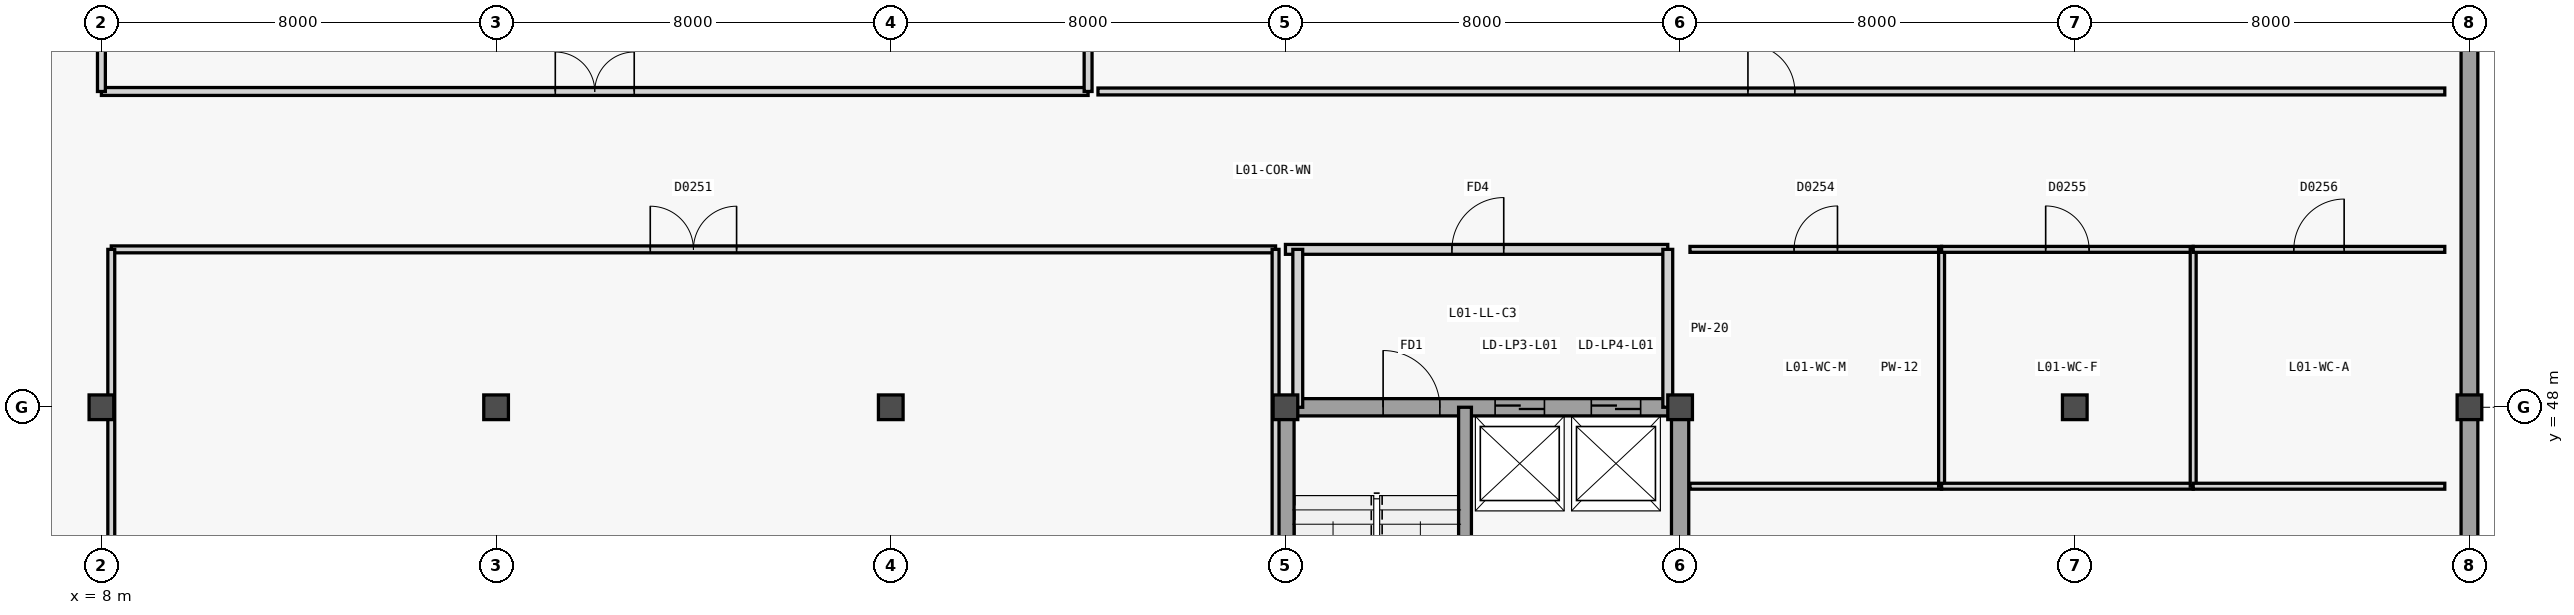
"""IFC4 building model, lengths in metres.
Left out: names, types, materials, properties, quantities, classifications, styles, units other than length and angle.
Written with IfcOpenShell. Run it as: python <this file> out.ifc"""

import sys

from ifc_helpers import new_model, si_unit, direction, frame, frame_2d, origin, origin_2d, place, context, subcontext, project, spatial, rectangle, extrude, element, fill, save


model = new_model("IFC4")
c1 = context("Model", 3, precision=1e-05, world=origin(), true_north=direction((0.0, 1.0)))
c2 = subcontext(c1, "Body", "Model", "MODEL_VIEW")
j1 = project(units=[si_unit("LENGTHUNIT", "METRE"), si_unit("PLANEANGLEUNIT", "RADIAN")], contexts=[c1])
p1 = place(None, origin())
s1 = spatial("IfcSite", under=j1, at=p1, CompositionType="ELEMENT")
p2 = place(p1, origin())
s2 = spatial("IfcBuilding", under=s1, at=p2, CompositionType="ELEMENT")
p3 = place(p2, frame((0.0, 0.0, 5.4)))
s3 = spatial("IfcBuildingStorey", under=s2, at=p3, CompositionType="ELEMENT", Elevation=5.4)
for number, where, z_axis, x_axis in (
    (1, (8.0, 48.0, 0.0), (0.0, 0.0, 1.0), (1.0, 0.0, 0.0)),
    (2, (16.0, 48.0, 0.0), (0.0, 0.0, 1.0), (1.0, 0.0, 0.0)),
    (3, (24.0, 48.0, 0.0), (0.0, 0.0, 1.0), (1.0, 0.0, 0.0)),
    (4, (32.0, 48.0, 0.0), (0.0, 0.0, 1.0), (1.0, 0.0, 0.0)),
    (5, (40.0, 48.0, 0.0), (0.0, 0.0, 1.0), (1.0, 0.0, 0.0)),
    (6, (48.0, 48.0, 0.0), (0.0, 0.0, 1.0), (1.0, 0.0, 0.0)),
):
    element("IfcColumn", number, at=place(p3, frame(where, z_axis=z_axis, x_axis=x_axis)), inside=s3, PredefinedType="COLUMN", context=c2, shape_type="SweptSolid", body=[
        extrude(rectangle(XDim=0.5, YDim=0.5, at=origin_2d()), origin(), (0.0, 0.0, 1.0), 4.8),
    ])
p4 = place(p3, frame((56.0, 48.0, 0.0), z_axis=(0.0, 0.0, 1.0), x_axis=(1.0, 0.0, 0.0)))
e7 = element("IfcColumn", 7, at=p4, inside=s3, PredefinedType="COLUMN", context=c2, shape_type="SweptSolid", body=[
    extrude(rectangle(XDim=0.5, YDim=0.5, at=origin_2d()), origin(), (0.0, 0.0, 1.0), 4.56),
])
p5 = place(p3, frame((56.0, 64.0, 0.0), z_axis=(0.0, 0.0, 1.0), x_axis=(0.0, -1.0, 0.0)))
e8 = element("IfcWall", 8, at=p5, inside=s3, PredefinedType="SOLIDWALL", context=c2, shape_type="SweptSolid", body=[
    extrude(rectangle(XDim=64.0, YDim=0.34, at=frame_2d((32.0, 0.0))), origin(), (0.0, 0.0, 1.0), 4.56),
])
for number, where, z_axis, x_axis in (
    (9, (32.0, 40.0, 0.0), (0.0, 0.0, 1.0), (0.0, 1.0, 0.0)),
    (10, (40.0, 40.0, 0.0), (0.0, 0.0, 1.0), (0.0, 1.0, 0.0)),
):
    element("IfcWall", number, at=place(p3, frame(where, z_axis=z_axis, x_axis=x_axis)), inside=s3, PredefinedType="SHEAR", context=c2, shape_type="SweptSolid", body=[
        extrude(rectangle(XDim=8.0, YDim=0.35, at=frame_2d((4.0, 0.0))), origin(), (0.0, 0.0, 1.0), 4.8),
    ])
p6 = place(p3, frame((32.0, 48.0, 0.0), z_axis=(0.0, 0.0, 1.0), x_axis=(1.0, 0.0, 0.0)))
e11 = element("IfcWall", 11, at=p6, inside=s3, PredefinedType="SHEAR", context=c2, shape_type="SweptSolid", body=[
    extrude(rectangle(XDim=8.0, YDim=0.35, at=frame_2d((4.0, 0.0))), origin(), (0.0, 0.0, 1.0), 4.8),
])
p7 = place(p6, frame((1.98, 0.0, 0.0)))
e12 = element("IfcOpeningElement", 12, at=p7, cuts=e11, PredefinedType="OPENING", context=c2, shape_type="SweptSolid", body=[
    extrude(rectangle(XDim=1.15, YDim=2.2, at=frame_2d((0.575, 1.1))), frame((0.0, 0.185, 0.0), z_axis=(0.0, -1.0, 0.0), x_axis=(1.0, 0.0, 0.0)), (0.0, 0.0, 1.0), 0.37),
])
p8 = place(p6, frame((4.25, 0.0, 0.0)))
e13 = element("IfcOpeningElement", 13, at=p8, cuts=e11, PredefinedType="OPENING", context=c2, shape_type="SweptSolid", body=[
    extrude(rectangle(XDim=1.0, YDim=2.15, at=frame_2d((0.5, 1.075))), frame((0.0, 0.185, 0.0), z_axis=(0.0, -1.0, 0.0), x_axis=(1.0, 0.0, 0.0)), (0.0, 0.0, 1.0), 0.37),
])
p9 = place(p6, frame((6.2, 0.0, 0.0)))
e14 = element("IfcOpeningElement", 14, at=p9, cuts=e11, PredefinedType="OPENING", context=c2, shape_type="SweptSolid", body=[
    extrude(rectangle(XDim=1.0, YDim=2.15, at=frame_2d((0.5, 1.075))), frame((0.0, 0.185, 0.0), z_axis=(0.0, -1.0, 0.0), x_axis=(1.0, 0.0, 0.0)), (0.0, 0.0, 1.0), 0.37),
])
p10 = place(p3, frame((35.64, 40.0, 0.0), z_axis=(0.0, 0.0, 1.0), x_axis=(0.0, 1.0, 0.0)))
e15 = element("IfcWall", 15, at=p10, inside=s3, PredefinedType="SHEAR", context=c2, shape_type="SweptSolid", body=[
    extrude(rectangle(XDim=8.0, YDim=0.26, at=frame_2d((4.0, 0.0))), origin(), (0.0, 0.0, 1.0), 4.8),
])
p11 = place(p3, frame((32.0, 51.2, 0.0), z_axis=(0.0, 0.0, 1.0), x_axis=(1.0, 0.0, 0.0)))
e16 = element("IfcWall", 16, at=p11, inside=s3, PredefinedType="PARTITIONING", context=c2, shape_type="SweptSolid", body=[
    extrude(rectangle(XDim=7.75, YDim=0.2, at=frame_2d((3.875, 0.0))), origin(), (0.0, 0.0, 1.0), 4.52),
])
p12 = place(p11, frame((3.375, 0.0, 0.0)))
e17 = element("IfcOpeningElement", 17, at=p12, cuts=e16, PredefinedType="OPENING", context=c2, shape_type="SweptSolid", body=[
    extrude(rectangle(XDim=1.05, YDim=2.15, at=frame_2d((0.525, 1.075))), frame((0.0, 0.11, 0.0), z_axis=(0.0, -1.0, 0.0), x_axis=(1.0, 0.0, 0.0)), (0.0, 0.0, 1.0), 0.22),
])
for number, where, z_axis, x_axis in (
    (18, (39.75, 48.0, 0.0), (0.0, 0.0, 1.0), (0.0, 1.0, 0.0)),
    (19, (32.25, 48.0, 0.0), (0.0, 0.0, 1.0), (0.0, 1.0, 0.0)),
):
    element("IfcWall", number, at=place(p3, frame(where, z_axis=z_axis, x_axis=x_axis)), inside=s3, PredefinedType="PARTITIONING", context=c2, shape_type="SweptSolid", body=[
        extrude(rectangle(XDim=3.2, YDim=0.2, at=frame_2d((1.6, 0.0))), origin(), (0.0, 0.0, 1.0), 3.92),
    ])
p13 = place(p3, frame((8.2, 51.2, 0.0), z_axis=(0.0, 0.0, 1.0), x_axis=(1.0, 0.0, 0.0)))
e20 = element("IfcWall", 20, at=p13, inside=s3, PredefinedType="PARTITIONING", context=c2, shape_type="SweptSolid", body=[
    extrude(rectangle(XDim=23.6, YDim=0.14, at=frame_2d((11.8, 0.0))), origin(), (0.0, 0.0, 1.0), 4.54),
])
p14 = place(p13, frame((10.925, 0.0, 0.0)))
e21 = element("IfcOpeningElement", 21, at=p14, cuts=e20, PredefinedType="OPENING", context=c2, shape_type="SweptSolid", body=[
    extrude(rectangle(XDim=1.75, YDim=2.2, at=frame_2d((0.875, 1.1))), frame((0.0, 0.08, 0.0), z_axis=(0.0, -1.0, 0.0), x_axis=(1.0, 0.0, 0.0)), (0.0, 0.0, 1.0), 0.16),
])
for number, where, z_axis, x_axis in (
    (22, (8.2, 32.2, 0.0), (0.0, 0.0, 1.0), (0.0, 1.0, 0.0)),
    (23, (31.8, 32.2, 0.0), (0.0, 0.0, 1.0), (0.0, 1.0, 0.0)),
):
    element("IfcWall", number, at=place(p3, frame(where, z_axis=z_axis, x_axis=x_axis)), inside=s3, PredefinedType="PARTITIONING", context=c2, shape_type="SweptSolid", body=[
        extrude(rectangle(XDim=19.0, YDim=0.14, at=frame_2d((9.5, 0.0))), origin(), (0.0, 0.0, 1.0), 3.92),
    ])
p15 = place(p3, frame((8.0, 54.4, 0.0), z_axis=(0.0, 0.0, 1.0), x_axis=(1.0, 0.0, 0.0)))
e24 = element("IfcWall", 24, at=p15, inside=s3, PredefinedType="PARTITIONING", context=c2, shape_type="SweptSolid", body=[
    extrude(rectangle(XDim=20.0, YDim=0.16, at=frame_2d((10.0, 0.0))), origin(), (0.0, 0.0, 1.0), 4.54),
])
p16 = place(p15, frame((9.2, 0.0, 0.0)))
e25 = element("IfcOpeningElement", 25, at=p16, cuts=e24, PredefinedType="OPENING", context=c2, shape_type="SweptSolid", body=[
    extrude(rectangle(XDim=1.6, YDim=2.2, at=frame_2d((0.8, 1.1))), frame((0.0, 0.09, 0.0), z_axis=(0.0, -1.0, 0.0), x_axis=(1.0, 0.0, 0.0)), (0.0, 0.0, 1.0), 0.18),
])
p17 = place(p3, frame((8.0, 54.4, 0.0), z_axis=(0.0, 0.0, 1.0), x_axis=(0.0, 1.0, 0.0)))
e26 = element("IfcWall", 26, at=p17, inside=s3, PredefinedType="PARTITIONING", context=c2, shape_type="SweptSolid", body=[
    extrude(rectangle(XDim=9.1, YDim=0.16, at=frame_2d((4.55, 0.0))), origin(), (0.0, 0.0, 1.0), 3.92),
])
p18 = place(p3, frame((28.0, 54.4, 0.0), z_axis=(0.0, 0.0, 1.0), x_axis=(0.0, 1.0, 0.0)))
e27 = element("IfcWall", 27, at=p18, inside=s3, PredefinedType="PARTITIONING", context=c2, shape_type="SweptSolid", body=[
    extrude(rectangle(XDim=9.1, YDim=0.16, at=frame_2d((4.55, 0.0))), origin(), (0.0, 0.0, 1.0), 4.08),
])
p19 = place(p3, frame((28.2, 54.4, 0.0), z_axis=(0.0, 0.0, 1.0), x_axis=(1.0, 0.0, 0.0)))
e28 = element("IfcWall", 28, at=p19, inside=s3, PredefinedType="PARTITIONING", context=c2, shape_type="SweptSolid", body=[
    extrude(rectangle(XDim=27.3, YDim=0.14, at=frame_2d((13.65, 0.0))), origin(), (0.0, 0.0, 1.0), 4.54),
])
p20 = place(p19, frame((13.175, 0.0, 0.0)))
e29 = element("IfcOpeningElement", 29, at=p20, cuts=e28, PredefinedType="OPENING", context=c2, shape_type="SweptSolid", body=[
    extrude(rectangle(XDim=0.95, YDim=2.1, at=frame_2d((0.475, 1.05))), frame((0.0, 0.08, 0.0), z_axis=(0.0, -1.0, 0.0), x_axis=(1.0, 0.0, 0.0)), (0.0, 0.0, 1.0), 0.16),
])
p21 = place(p3, frame((40.2, 46.4, 0.0), z_axis=(0.0, 0.0, 1.0), x_axis=(1.0, 0.0, 0.0)))
e30 = element("IfcWall", 30, at=p21, inside=s3, PredefinedType="PARTITIONING", context=c2, shape_type="SweptSolid", body=[
    extrude(rectangle(XDim=5.1, YDim=0.12, at=frame_2d((2.55, 0.0))), origin(), (0.0, 0.0, 1.0), 4.54),
])
p22 = place(p3, frame((40.2, 51.2, 0.0), z_axis=(0.0, 0.0, 1.0), x_axis=(1.0, 0.0, 0.0)))
e31 = element("IfcWall", 31, at=p22, inside=s3, PredefinedType="PARTITIONING", context=c2, shape_type="SweptSolid", body=[
    extrude(rectangle(XDim=5.1, YDim=0.12, at=frame_2d((2.55, 0.0))), origin(), (0.0, 0.0, 1.0), 4.54),
])
p23 = place(p22, frame((2.11, 0.0, 0.0)))
e32 = element("IfcOpeningElement", 32, at=p23, cuts=e31, PredefinedType="OPENING", context=c2, shape_type="SweptSolid", body=[
    extrude(rectangle(XDim=0.88, YDim=2.1, at=frame_2d((0.44, 1.05))), frame((0.0, 0.07, 0.0), z_axis=(0.0, -1.0, 0.0), x_axis=(1.0, 0.0, 0.0)), (0.0, 0.0, 1.0), 0.14),
])
p24 = place(p3, frame((45.3, 46.4, 0.0), z_axis=(0.0, 0.0, 1.0), x_axis=(0.0, 1.0, 0.0)))
e33 = element("IfcWall", 33, at=p24, inside=s3, PredefinedType="PARTITIONING", context=c2, shape_type="SweptSolid", body=[
    extrude(rectangle(XDim=4.8, YDim=0.12, at=frame_2d((2.4, 0.0))), origin(), (0.0, 0.0, 1.0), 4.54),
])
p25 = place(p3, frame((45.3, 46.4, 0.0), z_axis=(0.0, 0.0, 1.0), x_axis=(1.0, 0.0, 0.0)))
e34 = element("IfcWall", 34, at=p25, inside=s3, PredefinedType="PARTITIONING", context=c2, shape_type="SweptSolid", body=[
    extrude(rectangle(XDim=5.1, YDim=0.12, at=frame_2d((2.55, 0.0))), origin(), (0.0, 0.0, 1.0), 4.54),
])
p26 = place(p3, frame((45.3, 51.2, 0.0), z_axis=(0.0, 0.0, 1.0), x_axis=(1.0, 0.0, 0.0)))
e35 = element("IfcWall", 35, at=p26, inside=s3, PredefinedType="PARTITIONING", context=c2, shape_type="SweptSolid", body=[
    extrude(rectangle(XDim=5.1, YDim=0.12, at=frame_2d((2.55, 0.0))), origin(), (0.0, 0.0, 1.0), 4.54),
])
p27 = place(p26, frame((2.11, 0.0, 0.0)))
e36 = element("IfcOpeningElement", 36, at=p27, cuts=e35, PredefinedType="OPENING", context=c2, shape_type="SweptSolid", body=[
    extrude(rectangle(XDim=0.88, YDim=2.1, at=frame_2d((0.44, 1.05))), frame((0.0, 0.07, 0.0), z_axis=(0.0, -1.0, 0.0), x_axis=(1.0, 0.0, 0.0)), (0.0, 0.0, 1.0), 0.14),
])
p28 = place(p3, frame((50.4, 46.4, 0.0), z_axis=(0.0, 0.0, 1.0), x_axis=(0.0, 1.0, 0.0)))
e37 = element("IfcWall", 37, at=p28, inside=s3, PredefinedType="PARTITIONING", context=c2, shape_type="SweptSolid", body=[
    extrude(rectangle(XDim=4.8, YDim=0.12, at=frame_2d((2.4, 0.0))), origin(), (0.0, 0.0, 1.0), 4.54),
])
p29 = place(p3, frame((50.4, 46.4, 0.0), z_axis=(0.0, 0.0, 1.0), x_axis=(1.0, 0.0, 0.0)))
e38 = element("IfcWall", 38, at=p29, inside=s3, PredefinedType="PARTITIONING", context=c2, shape_type="SweptSolid", body=[
    extrude(rectangle(XDim=5.1, YDim=0.12, at=frame_2d((2.55, 0.0))), origin(), (0.0, 0.0, 1.0), 4.54),
])
p30 = place(p3, frame((50.4, 51.2, 0.0), z_axis=(0.0, 0.0, 1.0), x_axis=(1.0, 0.0, 0.0)))
e39 = element("IfcWall", 39, at=p30, inside=s3, PredefinedType="PARTITIONING", context=c2, shape_type="SweptSolid", body=[
    extrude(rectangle(XDim=5.1, YDim=0.12, at=frame_2d((2.55, 0.0))), origin(), (0.0, 0.0, 1.0), 4.54),
])
p31 = place(p30, frame((2.04, 0.0, 0.0)))
e40 = element("IfcOpeningElement", 40, at=p31, cuts=e39, PredefinedType="OPENING", context=c2, shape_type="SweptSolid", body=[
    extrude(rectangle(XDim=1.02, YDim=2.1, at=frame_2d((0.51, 1.05))), frame((0.0, 0.07, 0.0), z_axis=(0.0, -1.0, 0.0), x_axis=(1.0, 0.0, 0.0)), (0.0, 0.0, 1.0), 0.14),
])
p32 = place(p7, origin())
e41 = element("IfcDoor", 41, at=p32, inside=s3, OperationType="SINGLE_SWING_LEFT", PredefinedType="DOOR", context=c2, shape_type="SweptSolid", body=[
    extrude(rectangle(XDim=1.15, YDim=2.2, at=frame_2d((0.575, 1.1))), frame((0.0, 0.025, 0.0), z_axis=(0.0, -1.0, 0.0), x_axis=(1.0, 0.0, 0.0)), (0.0, 0.0, 1.0), 0.05),
])
fill(e12, e41)
p33 = place(p8, origin())
e42 = element("IfcDoor", 42, at=p33, inside=s3, OperationType="DOUBLE_DOOR_SLIDING", PredefinedType="DOOR", context=c2, shape_type="SweptSolid", body=[
    extrude(rectangle(XDim=1.0, YDim=2.15, at=frame_2d((0.5, 1.075))), frame((0.0, 0.025, 0.0), z_axis=(0.0, -1.0, 0.0), x_axis=(1.0, 0.0, 0.0)), (0.0, 0.0, 1.0), 0.05),
])
fill(e13, e42)
p34 = place(p9, origin())
e43 = element("IfcDoor", 43, at=p34, inside=s3, OperationType="DOUBLE_DOOR_SLIDING", PredefinedType="DOOR", context=c2, shape_type="SweptSolid", body=[
    extrude(rectangle(XDim=1.0, YDim=2.15, at=frame_2d((0.5, 1.075))), frame((0.0, 0.025, 0.0), z_axis=(0.0, -1.0, 0.0), x_axis=(1.0, 0.0, 0.0)), (0.0, 0.0, 1.0), 0.05),
])
fill(e14, e43)
p35 = place(p12, origin())
e44 = element("IfcDoor", 44, at=p35, inside=s3, OperationType="SINGLE_SWING_RIGHT", PredefinedType="DOOR", context=c2, shape_type="SweptSolid", body=[
    extrude(rectangle(XDim=1.05, YDim=2.15, at=frame_2d((0.525, 1.075))), frame((0.0, 0.025, 0.0), z_axis=(0.0, -1.0, 0.0), x_axis=(1.0, 0.0, 0.0)), (0.0, 0.0, 1.0), 0.05),
])
fill(e17, e44)
p36 = place(p14, origin())
e45 = element("IfcDoor", 45, at=p36, inside=s3, OperationType="DOUBLE_DOOR_SINGLE_SWING", PredefinedType="DOOR", context=c2, shape_type="SweptSolid", body=[
    extrude(rectangle(XDim=1.75, YDim=2.2, at=frame_2d((0.875, 1.1))), frame((0.0, 0.025, 0.0), z_axis=(0.0, -1.0, 0.0), x_axis=(1.0, 0.0, 0.0)), (0.0, 0.0, 1.0), 0.05),
])
fill(e21, e45)
p37 = place(p16, origin())
e46 = element("IfcDoor", 46, at=p37, inside=s3, OperationType="DOUBLE_DOOR_SINGLE_SWING", PredefinedType="DOOR", context=c2, shape_type="SweptSolid", body=[
    extrude(rectangle(XDim=1.6, YDim=2.2, at=frame_2d((0.8, 1.1))), frame((0.0, 0.025, 0.0), z_axis=(0.0, -1.0, 0.0), x_axis=(1.0, 0.0, 0.0)), (0.0, 0.0, 1.0), 0.05),
])
fill(e25, e46)
p38 = place(p20, origin())
e47 = element("IfcDoor", 47, at=p38, inside=s3, OperationType="SINGLE_SWING_LEFT", PredefinedType="DOOR", context=c2, shape_type="SweptSolid", body=[
    extrude(rectangle(XDim=0.95, YDim=2.1, at=frame_2d((0.475, 1.05))), frame((0.0, 0.025, 0.0), z_axis=(0.0, -1.0, 0.0), x_axis=(1.0, 0.0, 0.0)), (0.0, 0.0, 1.0), 0.05),
])
fill(e29, e47)
p39 = place(p23, origin())
e48 = element("IfcDoor", 48, at=p39, inside=s3, OperationType="SINGLE_SWING_RIGHT", PredefinedType="DOOR", context=c2, shape_type="SweptSolid", body=[
    extrude(rectangle(XDim=0.88, YDim=2.1, at=frame_2d((0.44, 1.05))), frame((0.0, 0.025, 0.0), z_axis=(0.0, -1.0, 0.0), x_axis=(1.0, 0.0, 0.0)), (0.0, 0.0, 1.0), 0.05),
])
fill(e32, e48)
p40 = place(p27, origin())
e49 = element("IfcDoor", 49, at=p40, inside=s3, OperationType="SINGLE_SWING_LEFT", PredefinedType="DOOR", context=c2, shape_type="SweptSolid", body=[
    extrude(rectangle(XDim=0.88, YDim=2.1, at=frame_2d((0.44, 1.05))), frame((0.0, 0.025, 0.0), z_axis=(0.0, -1.0, 0.0), x_axis=(1.0, 0.0, 0.0)), (0.0, 0.0, 1.0), 0.05),
])
fill(e36, e49)
p41 = place(p31, origin())
e50 = element("IfcDoor", 50, at=p41, inside=s3, OperationType="SINGLE_SWING_RIGHT", PredefinedType="DOOR", context=c2, shape_type="SweptSolid", body=[
    extrude(rectangle(XDim=1.02, YDim=2.1, at=frame_2d((0.51, 1.05))), frame((0.0, 0.025, 0.0), z_axis=(0.0, -1.0, 0.0), x_axis=(1.0, 0.0, 0.0)), (0.0, 0.0, 1.0), 0.05),
])
fill(e40, e50)
save(model, sys.argv[1])
